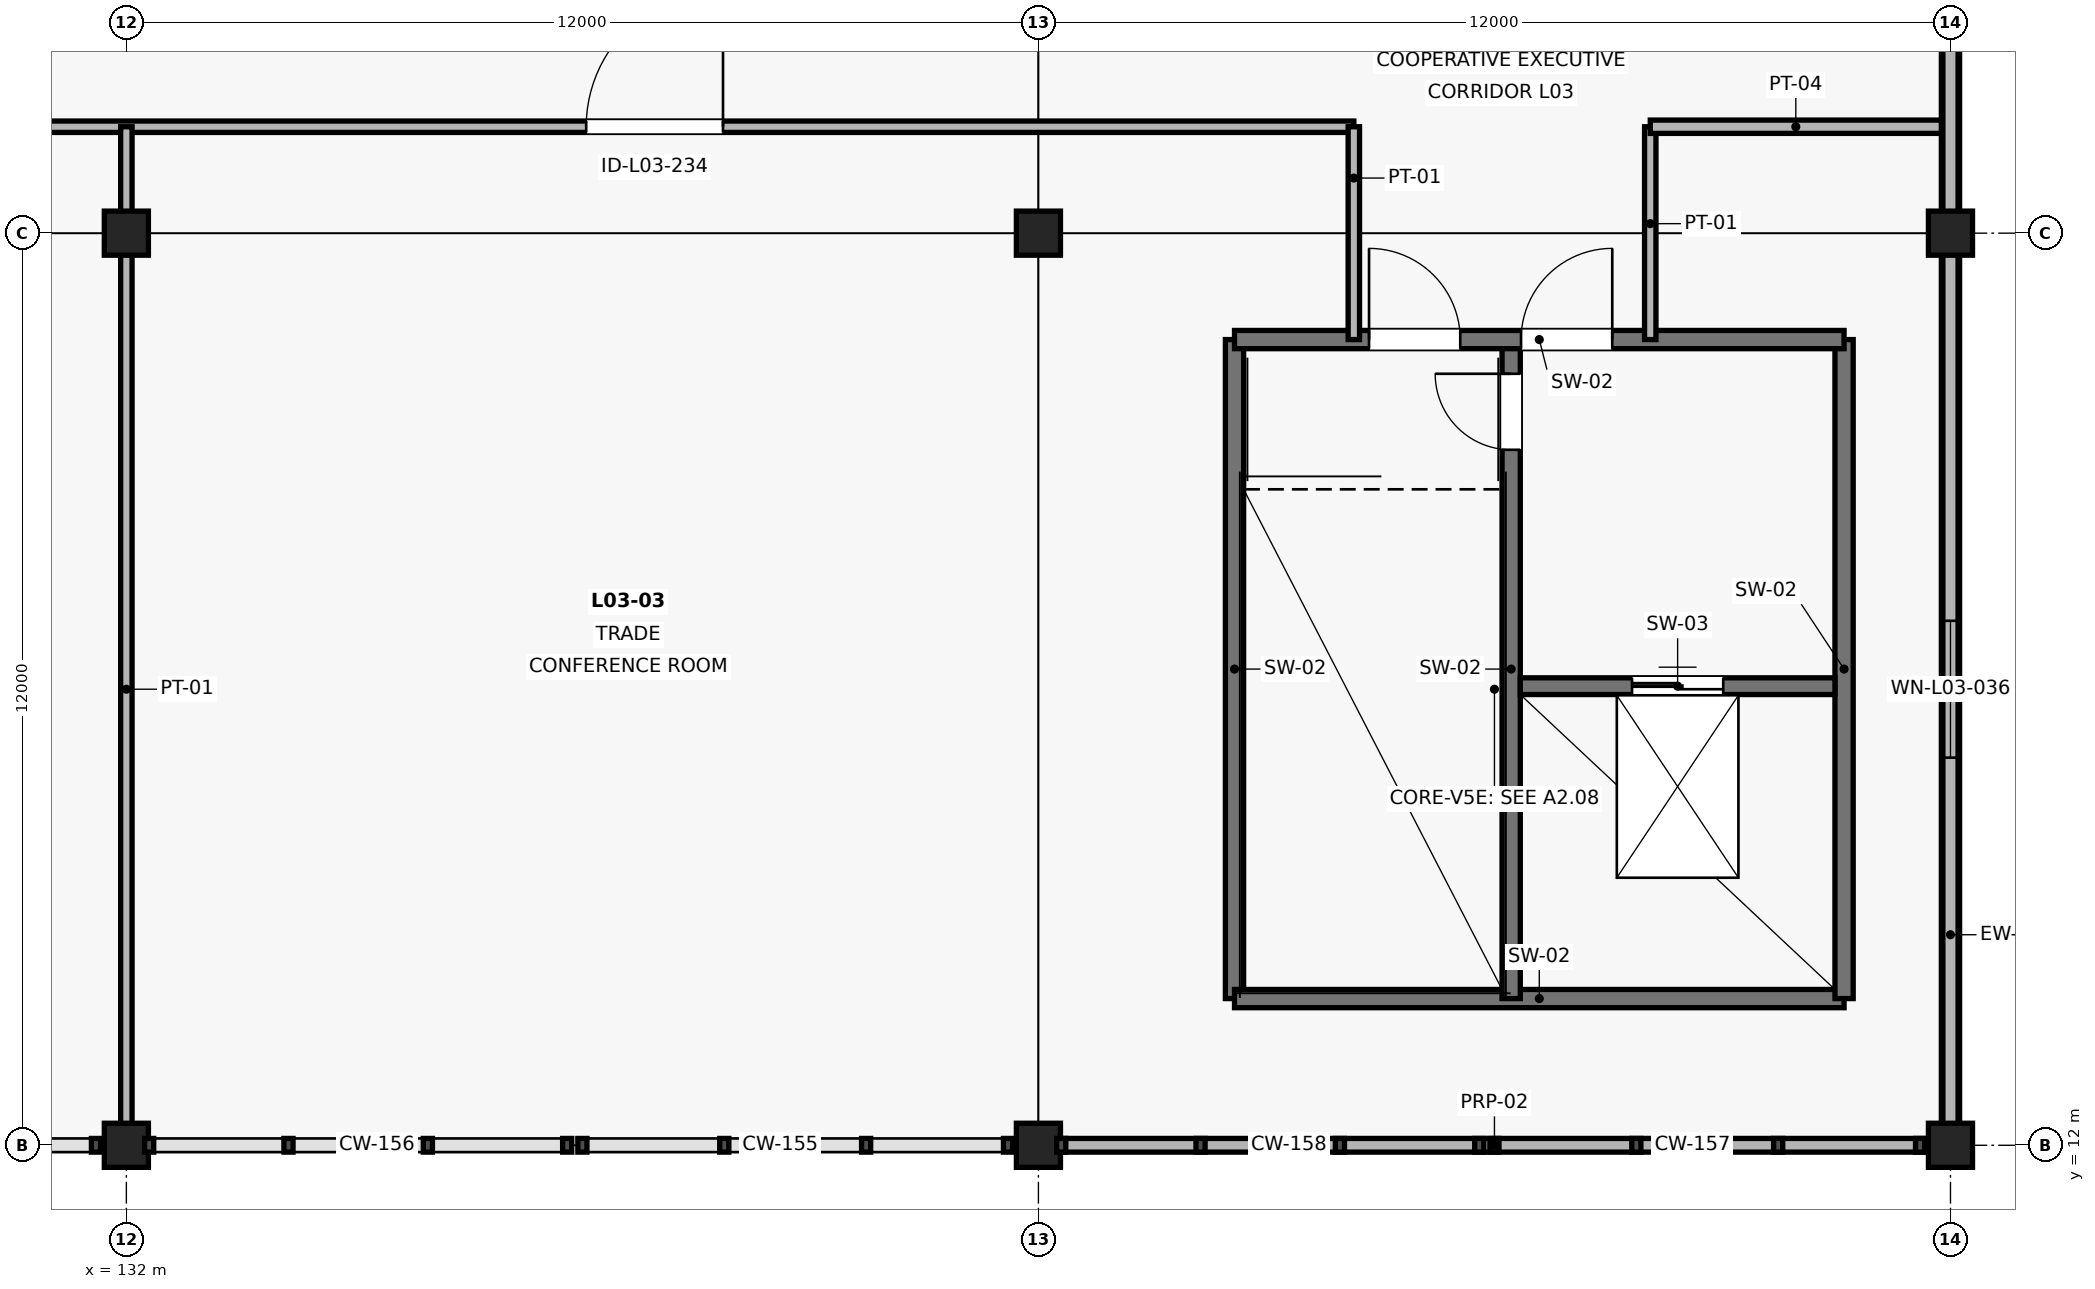
"""IFC4 building model, lengths in metres.
Left out: names, types, materials, properties, quantities, classifications, styles, units other than length and angle.
Written with IfcOpenShell. Run it as: python <this file> out.ifc"""

import sys

from ifc_helpers import new_model, si_unit, direction, frame, frame_2d, origin, origin_2d, place, context, subcontext, project, spatial, rectangle, extrude, element, fill, save


model = new_model("IFC4")
c1 = context("Model", 3, precision=1e-05, world=origin(), true_north=direction((0.0, 1.0)))
c2 = subcontext(c1, "Body", "Model", "MODEL_VIEW")
j1 = project(units=[si_unit("LENGTHUNIT", "METRE"), si_unit("PLANEANGLEUNIT", "RADIAN")], contexts=[c1])
p1 = place(None, origin())
s1 = spatial("IfcSite", under=j1, at=p1, CompositionType="ELEMENT")
p2 = place(p1, origin())
s2 = spatial("IfcBuilding", under=s1, at=p2, CompositionType="ELEMENT")
p3 = place(p2, frame((0.0, 0.0, 16.2)))
s3 = spatial("IfcBuildingStorey", under=s2, at=p3, CompositionType="ELEMENT", Elevation=16.2)
for number, where, z_axis, x_axis in (
    (1, (132.0, 12.0, 0.0), (0.0, 0.0, 1.0), (1.0, 0.0, 0.0)),
    (2, (132.0, 24.0, 0.0), (0.0, 0.0, 1.0), (1.0, 0.0, 0.0)),
    (3, (144.0, 12.0, 0.0), (0.0, 0.0, 1.0), (1.0, 0.0, 0.0)),
    (4, (144.0, 24.0, 0.0), (0.0, 0.0, 1.0), (1.0, 0.0, 0.0)),
    (5, (156.0, 12.0, 0.0), (0.0, 0.0, 1.0), (1.0, 0.0, 0.0)),
    (6, (156.0, 24.0, 0.0), (0.0, 0.0, 1.0), (1.0, 0.0, 0.0)),
):
    element("IfcColumn", number, at=place(p3, frame(where, z_axis=z_axis, x_axis=x_axis)), inside=s3, PredefinedType="COLUMN", context=c2, shape_type="SweptSolid", body=[
        extrude(rectangle(XDim=0.58, YDim=0.58, at=origin_2d()), origin(), (0.0, 0.0, 1.0), 4.8),
    ])
p4 = place(p3, frame((156.0, 23.71, 0.0), z_axis=(0.0, 0.0, 1.0), x_axis=(0.0, -1.0, 0.0)))
e7 = element("IfcWall", 7, at=p4, inside=s3, PredefinedType="SOLIDWALL", context=c2, shape_type="SweptSolid", body=[
    extrude(rectangle(XDim=11.42, YDim=0.24, at=frame_2d((5.71, 0.0))), origin(), (0.0, 0.0, 1.0), 3.618),
])
p5 = place(p4, frame((4.81, 0.0, 1.1)))
e8 = element("IfcOpeningElement", 8, at=p5, cuts=e7, PredefinedType="OPENING", context=c2, shape_type="SweptSolid", body=[
    extrude(rectangle(XDim=1.8, YDim=1.5, at=frame_2d((0.9, 0.75))), frame((0.0, 0.135, 0.0), z_axis=(0.0, -1.0, 0.0), x_axis=(1.0, 0.0, 0.0)), (0.0, 0.0, 1.0), 0.27),
])
p6 = place(p3, frame((156.0, 35.71, 0.0), z_axis=(0.0, 0.0, 1.0), x_axis=(0.0, -1.0, 0.0)))
e9 = element("IfcWall", 9, at=p6, inside=s3, PredefinedType="SOLIDWALL", context=c2, shape_type="SweptSolid", body=[
    extrude(rectangle(XDim=11.42, YDim=0.24, at=frame_2d((5.71, 0.0))), origin(), (0.0, 0.0, 1.0), 3.568),
])
p7 = place(p6, frame((3.31, 0.0, 1.1)))
e10 = element("IfcOpeningElement", 10, at=p7, cuts=e9, PredefinedType="OPENING", context=c2, shape_type="SweptSolid", body=[
    extrude(rectangle(XDim=1.8, YDim=1.5, at=frame_2d((0.9, 0.75))), frame((0.0, 0.135, 0.0), z_axis=(0.0, -1.0, 0.0), x_axis=(1.0, 0.0, 0.0)), (0.0, 0.0, 1.0), 0.27),
])
p8 = place(p3, frame((144.0, 12.0, 4.8), z_axis=(0.0, 0.0, 1.0), x_axis=(1.0, 0.0, 0.0)))
e11 = element("IfcWall", 11, at=p8, inside=s3, PredefinedType="PARAPET", context=c2, shape_type="SweptSolid", body=[
    extrude(rectangle(XDim=12.0, YDim=0.18, at=frame_2d((6.0, 0.0))), origin(), (0.0, 0.0, 1.0), 1.15),
])
p9 = place(p3, frame((156.0, 12.0, 4.8), z_axis=(0.0, 0.0, 1.0), x_axis=(0.0, 1.0, 0.0)))
e12 = element("IfcWall", 12, at=p9, inside=s3, PredefinedType="PARAPET", context=c2, shape_type="SweptSolid", body=[
    extrude(rectangle(XDim=24.0, YDim=0.2, at=frame_2d((12.0, 0.0))), origin(), (0.0, 0.0, 1.0), 1.15),
])
p10 = place(p3, frame((146.58, 22.6, 0.0), z_axis=(0.0, 0.0, 1.0), x_axis=(0.0, -1.0, 0.0)))
e13 = element("IfcWall", 13, at=p10, inside=s3, PredefinedType="SHEAR", context=c2, shape_type="SweptSolid", body=[
    extrude(rectangle(XDim=8.67, YDim=0.24, at=frame_2d((4.335, 0.0))), origin(), (0.0, 0.0, 1.0), 4.58),
])
p11 = place(p3, frame((146.58, 13.93, 0.0), z_axis=(0.0, 0.0, 1.0), x_axis=(1.0, 0.0, 0.0)))
e14 = element("IfcWall", 14, at=p11, inside=s3, PredefinedType="SHEAR", context=c2, shape_type="SweptSolid", body=[
    extrude(rectangle(XDim=8.02, YDim=0.24, at=frame_2d((4.01, 0.0))), origin(), (0.0, 0.0, 1.0), 4.58),
])
p12 = place(p3, frame((150.22, 13.93, 0.0), z_axis=(0.0, 0.0, 1.0), x_axis=(0.0, 1.0, 0.0)))
e15 = element("IfcWall", 15, at=p12, inside=s3, PredefinedType="SHEAR", context=c2, shape_type="SweptSolid", body=[
    extrude(rectangle(XDim=8.67, YDim=0.24, at=frame_2d((4.335, 0.0))), origin(), (0.0, 0.0, 1.0), 4.58),
])
p13 = place(p12, frame((7.22, 0.0, 0.0)))
e16 = element("IfcOpeningElement", 16, at=p13, cuts=e15, PredefinedType="OPENING", context=c2, shape_type="SweptSolid", body=[
    extrude(rectangle(XDim=1.0, YDim=2.2, at=frame_2d((0.5, 1.1))), frame((0.0, 0.135, 0.0), z_axis=(0.0, -1.0, 0.0), x_axis=(1.0, 0.0, 0.0)), (0.0, 0.0, 1.0), 0.27),
])
p14 = place(p3, frame((154.6, 13.93, 0.0), z_axis=(0.0, 0.0, 1.0), x_axis=(0.0, 1.0, 0.0)))
e17 = element("IfcWall", 17, at=p14, inside=s3, PredefinedType="SHEAR", context=c2, shape_type="SweptSolid", body=[
    extrude(rectangle(XDim=8.67, YDim=0.24, at=frame_2d((4.335, 0.0))), origin(), (0.0, 0.0, 1.0), 4.58),
])
p15 = place(p3, frame((146.58, 22.6, 0.0), z_axis=(0.0, 0.0, 1.0), x_axis=(1.0, 0.0, 0.0)))
e18 = element("IfcWall", 18, at=p15, inside=s3, PredefinedType="SHEAR", context=c2, shape_type="SweptSolid", body=[
    extrude(rectangle(XDim=8.02, YDim=0.24, at=frame_2d((4.01, 0.0))), origin(), (0.0, 0.0, 1.0), 4.58),
])
p16 = place(p15, frame((1.77, 0.0, 0.0)))
e19 = element("IfcOpeningElement", 19, at=p16, cuts=e18, PredefinedType="OPENING", context=c2, shape_type="SweptSolid", body=[
    extrude(rectangle(XDim=1.2, YDim=2.2, at=frame_2d((0.6, 1.1))), frame((0.0, 0.135, 0.0), z_axis=(0.0, -1.0, 0.0), x_axis=(1.0, 0.0, 0.0)), (0.0, 0.0, 1.0), 0.27),
])
p17 = place(p15, frame((3.77, 0.0, 0.0)))
e20 = element("IfcOpeningElement", 20, at=p17, cuts=e18, PredefinedType="OPENING", context=c2, shape_type="SweptSolid", body=[
    extrude(rectangle(XDim=1.2, YDim=2.2, at=frame_2d((0.6, 1.1))), frame((0.0, 0.135, 0.0), z_axis=(0.0, -1.0, 0.0), x_axis=(1.0, 0.0, 0.0)), (0.0, 0.0, 1.0), 0.27),
])
p18 = place(p3, frame((150.34, 18.04, 0.0), z_axis=(0.0, 0.0, 1.0), x_axis=(1.0, 0.0, 0.0)))
e21 = element("IfcWall", 21, at=p18, inside=s3, PredefinedType="SHEAR", context=c2, shape_type="SweptSolid", body=[
    extrude(rectangle(XDim=4.14, YDim=0.22, at=frame_2d((2.07, 0.0))), origin(), (0.0, 0.0, 1.0), 4.58),
])
p19 = place(p18, frame((1.47, 0.0, 0.0)))
e22 = element("IfcOpeningElement", 22, at=p19, cuts=e21, PredefinedType="OPENING", context=c2, shape_type="SweptSolid", body=[
    extrude(rectangle(XDim=1.2, YDim=2.2, at=frame_2d((0.6, 1.1))), frame((0.0, 0.125, 0.0), z_axis=(0.0, -1.0, 0.0), x_axis=(1.0, 0.0, 0.0)), (0.0, 0.0, 1.0), 0.25),
])
p20 = place(p3, frame((116.05, 25.4, 0.0), z_axis=(0.0, 0.0, 1.0), x_axis=(1.0, 0.0, 0.0)))
e23 = element("IfcWall", 23, at=p20, inside=s3, PredefinedType="PARTITIONING", context=c2, shape_type="SweptSolid", body=[
    extrude(rectangle(XDim=32.1, YDim=0.15, at=frame_2d((16.05, 0.0))), origin(), (0.0, 0.0, 1.0), 3.713),
])
p21 = place(p20, frame((8.0, 0.0, 0.0)))
e24 = element("IfcOpeningElement", 24, at=p21, cuts=e23, PredefinedType="OPENING", context=c2, shape_type="SweptSolid", body=[
    extrude(rectangle(XDim=1.0, YDim=2.2, at=frame_2d((0.5, 1.1))), frame((0.0, 0.09, 0.0), z_axis=(0.0, -1.0, 0.0), x_axis=(1.0, 0.0, 0.0)), (0.0, 0.0, 1.0), 0.18),
])
p22 = place(p20, frame((22.0, 0.0, 0.0)))
e25 = element("IfcOpeningElement", 25, at=p22, cuts=e23, PredefinedType="OPENING", context=c2, shape_type="SweptSolid", body=[
    extrude(rectangle(XDim=1.8, YDim=2.2, at=frame_2d((0.9, 1.1))), frame((0.0, 0.09, 0.0), z_axis=(0.0, -1.0, 0.0), x_axis=(1.0, 0.0, 0.0)), (0.0, 0.0, 1.0), 0.18),
])
for number, where, z_axis, x_axis in (
    (26, (148.15, 22.6, 0.0), (0.0, 0.0, 1.0), (0.0, 1.0, 0.0)),
    (27, (152.05, 22.6, 0.0), (0.0, 0.0, 1.0), (0.0, 1.0, 0.0)),
):
    element("IfcWall", number, at=place(p3, frame(where, z_axis=z_axis, x_axis=x_axis)), inside=s3, PredefinedType="PARTITIONING", context=c2, shape_type="SweptSolid", body=[
        extrude(rectangle(XDim=2.8, YDim=0.15, at=frame_2d((1.4, 0.0))), origin(), (0.0, 0.0, 1.0), 3.623),
    ])
p23 = place(p3, frame((152.05, 25.4, 0.0), z_axis=(0.0, 0.0, 1.0), x_axis=(1.0, 0.0, 0.0)))
e28 = element("IfcWall", 28, at=p23, inside=s3, PredefinedType="PARTITIONING", context=c2, shape_type="SweptSolid", body=[
    extrude(rectangle(XDim=3.83, YDim=0.175, at=frame_2d((1.915, 0.0))), origin(), (0.0, 0.0, 1.0), 3.573),
])
p24 = place(p3, frame((132.0, 12.04, 0.0), z_axis=(0.0, 0.0, 1.0), x_axis=(0.0, 1.0, 0.0)))
e29 = element("IfcWall", 29, at=p24, inside=s3, PredefinedType="PARTITIONING", context=c2, shape_type="SweptSolid", body=[
    extrude(rectangle(XDim=13.36, YDim=0.15, at=frame_2d((6.68, 0.0))), origin(), (0.0, 0.0, 1.0), 3.563),
])
p25 = place(p5, origin())
e30 = element("IfcWindow", 30, at=p25, inside=s3, PartitioningType="SINGLE_PANEL", PredefinedType="WINDOW", context=c2, shape_type="SweptSolid", body=[
    extrude(rectangle(XDim=1.8, YDim=1.5, at=frame_2d((0.9, 0.75))), frame((0.0, 0.03, 0.0), z_axis=(0.0, -1.0, 0.0), x_axis=(1.0, 0.0, 0.0)), (0.0, 0.0, 1.0), 0.06),
])
fill(e8, e30)
p26 = place(p16, origin())
e31 = element("IfcDoor", 31, at=p26, inside=s3, OperationType="SINGLE_SWING_LEFT", PredefinedType="DOOR", context=c2, shape_type="SweptSolid", body=[
    extrude(rectangle(XDim=1.2, YDim=2.2, at=frame_2d((0.6, 1.1))), frame((0.0, 0.025, 0.0), z_axis=(0.0, -1.0, 0.0), x_axis=(1.0, 0.0, 0.0)), (0.0, 0.0, 1.0), 0.05),
])
fill(e19, e31)
p27 = place(p17, origin())
e32 = element("IfcDoor", 32, at=p27, inside=s3, OperationType="SINGLE_SWING_RIGHT", PredefinedType="DOOR", context=c2, shape_type="SweptSolid", body=[
    extrude(rectangle(XDim=1.2, YDim=2.2, at=frame_2d((0.6, 1.1))), frame((0.0, 0.025, 0.0), z_axis=(0.0, -1.0, 0.0), x_axis=(1.0, 0.0, 0.0)), (0.0, 0.0, 1.0), 0.05),
])
fill(e20, e32)
p28 = place(p13, origin())
e33 = element("IfcDoor", 33, at=p28, inside=s3, OperationType="SINGLE_SWING_RIGHT", PredefinedType="DOOR", context=c2, shape_type="SweptSolid", body=[
    extrude(rectangle(XDim=1.0, YDim=2.2, at=frame_2d((0.5, 1.1))), frame((0.0, 0.025, 0.0), z_axis=(0.0, -1.0, 0.0), x_axis=(1.0, 0.0, 0.0)), (0.0, 0.0, 1.0), 0.05),
])
fill(e16, e33)
p29 = place(p19, origin())
e34 = element("IfcDoor", 34, at=p29, inside=s3, OperationType="DOUBLE_DOOR_SLIDING", PredefinedType="DOOR", context=c2, shape_type="SweptSolid", body=[
    extrude(rectangle(XDim=1.2, YDim=2.2, at=frame_2d((0.6, 1.1))), frame((0.0, 0.025, 0.0), z_axis=(0.0, -1.0, 0.0), x_axis=(1.0, 0.0, 0.0)), (0.0, 0.0, 1.0), 0.05),
])
fill(e22, e34)
p30 = place(p22, origin())
e35 = element("IfcDoor", 35, at=p30, inside=s3, OperationType="SINGLE_SWING_RIGHT", PredefinedType="DOOR", context=c2, shape_type="SweptSolid", body=[
    extrude(rectangle(XDim=1.8, YDim=2.2, at=frame_2d((0.9, 1.1))), frame((0.0, 0.025, 0.0), z_axis=(0.0, -1.0, 0.0), x_axis=(1.0, 0.0, 0.0)), (0.0, 0.0, 1.0), 0.05),
])
fill(e25, e35)
save(model, sys.argv[1])
